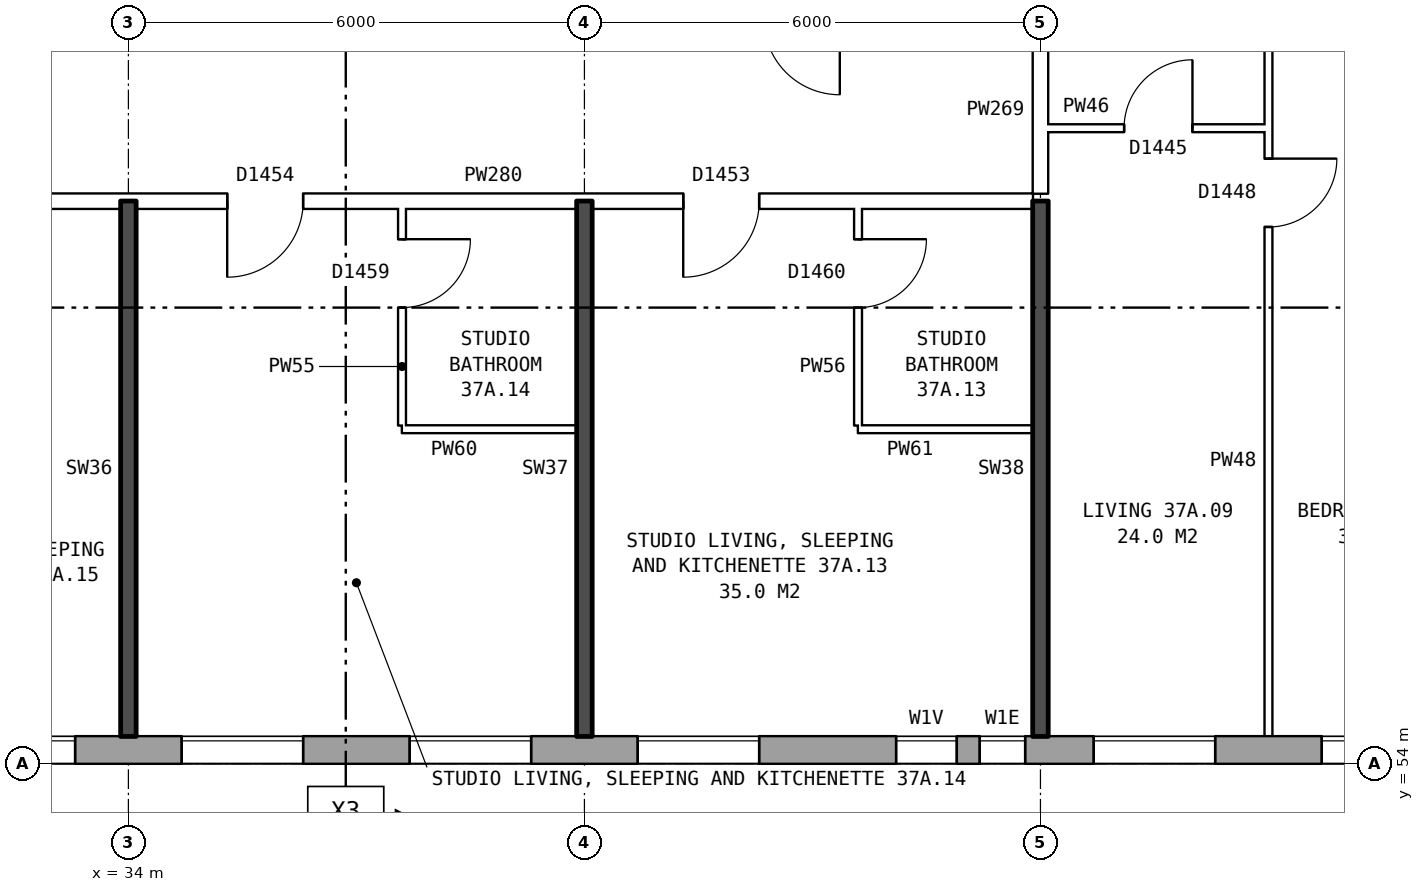
"""IFC4 building model, lengths in metres.
Left out: names, types, materials, properties, quantities, classifications, styles, units other than length and angle.
Written with IfcOpenShell. Run it as: python <this file> out.ifc"""

import sys

from ifc_helpers import new_model, si_unit, direction, frame, frame_2d, origin, place, context, subcontext, project, spatial, rectangle, extrude, element, fill, save


model = new_model("IFC4")
c1 = context("Model", 3, precision=1e-05, world=origin(), true_north=direction((0.0, 1.0)))
c2 = subcontext(c1, "Body", "Model", "MODEL_VIEW")
j1 = project(units=[si_unit("LENGTHUNIT", "METRE"), si_unit("PLANEANGLEUNIT", "RADIAN")], contexts=[c1])
p1 = place(None, origin())
s1 = spatial("IfcSite", under=j1, at=p1, CompositionType="ELEMENT")
p2 = place(p1, origin())
s2 = spatial("IfcBuilding", under=s1, at=p2, CompositionType="ELEMENT")
p3 = place(p2, frame((0.0, 0.0, 133.0)))
s3 = spatial("IfcBuildingStorey", under=s2, at=p3, CompositionType="ELEMENT", Elevation=133.0)
p4 = place(p3, frame((29.825, 54.18, 0.0), z_axis=(0.0, 0.0, 1.0), x_axis=(1.0, 0.0, 0.0)))
e1 = element("IfcWall", 1, at=p4, inside=s3, PredefinedType="STANDARD", context=c2, shape_type="SweptSolid", body=[
    extrude(rectangle(XDim=43.101, YDim=0.36, at=frame_2d((21.55, 0.0))), origin(), (0.0, 0.0, 1.0), 2.85),
])
p5 = place(p4, frame((1.875, 0.0, 0.8)))
e2 = element("IfcOpeningElement", 2, at=p5, cuts=e1, PredefinedType="OPENING", context=c2, shape_type="SweptSolid", body=[
    extrude(rectangle(XDim=1.6, YDim=1.8, at=frame_2d((0.8, 0.9))), frame((0.0, 0.19, 0.0), z_axis=(0.0, -1.0, 0.0), x_axis=(1.0, 0.0, 0.0)), (0.0, 0.0, 1.0), 0.38),
])
p6 = place(p4, frame((4.875, 0.0, 0.8)))
e3 = element("IfcOpeningElement", 3, at=p6, cuts=e1, PredefinedType="OPENING", context=c2, shape_type="SweptSolid", body=[
    extrude(rectangle(XDim=1.6, YDim=1.8, at=frame_2d((0.8, 0.9))), frame((0.0, 0.19, 0.0), z_axis=(0.0, -1.0, 0.0), x_axis=(1.0, 0.0, 0.0)), (0.0, 0.0, 1.0), 0.38),
])
p7 = place(p4, frame((7.875, 0.0, 0.8)))
e4 = element("IfcOpeningElement", 4, at=p7, cuts=e1, PredefinedType="OPENING", context=c2, shape_type="SweptSolid", body=[
    extrude(rectangle(XDim=1.6, YDim=1.8, at=frame_2d((0.8, 0.9))), frame((0.0, 0.19, 0.0), z_axis=(0.0, -1.0, 0.0), x_axis=(1.0, 0.0, 0.0)), (0.0, 0.0, 1.0), 0.38),
])
p8 = place(p4, frame((10.875, 0.0, 0.8)))
e5 = element("IfcOpeningElement", 5, at=p8, cuts=e1, PredefinedType="OPENING", context=c2, shape_type="SweptSolid", body=[
    extrude(rectangle(XDim=1.6, YDim=1.8, at=frame_2d((0.8, 0.9))), frame((0.0, 0.19, 0.0), z_axis=(0.0, -1.0, 0.0), x_axis=(1.0, 0.0, 0.0)), (0.0, 0.0, 1.0), 0.38),
])
p9 = place(p4, frame((14.275, 0.0, 0.8)))
e6 = element("IfcOpeningElement", 6, at=p9, cuts=e1, PredefinedType="OPENING", context=c2, shape_type="SweptSolid", body=[
    extrude(rectangle(XDim=0.8, YDim=0.9, at=frame_2d((0.4, 0.45))), frame((0.0, 0.19, 0.0), z_axis=(0.0, -1.0, 0.0), x_axis=(1.0, 0.0, 0.0)), (0.0, 0.0, 1.0), 0.38),
])
p10 = place(p4, frame((16.875, 0.0, 0.8)))
e7 = element("IfcOpeningElement", 7, at=p10, cuts=e1, PredefinedType="OPENING", context=c2, shape_type="SweptSolid", body=[
    extrude(rectangle(XDim=1.6, YDim=1.8, at=frame_2d((0.8, 0.9))), frame((0.0, 0.19, 0.0), z_axis=(0.0, -1.0, 0.0), x_axis=(1.0, 0.0, 0.0)), (0.0, 0.0, 1.0), 0.38),
])
p11 = place(p4, frame((19.875, 0.0, 0.8)))
e8 = element("IfcOpeningElement", 8, at=p11, cuts=e1, PredefinedType="OPENING", context=c2, shape_type="SweptSolid", body=[
    extrude(rectangle(XDim=1.6, YDim=1.8, at=frame_2d((0.8, 0.9))), frame((0.0, 0.19, 0.0), z_axis=(0.0, -1.0, 0.0), x_axis=(1.0, 0.0, 0.0)), (0.0, 0.0, 1.0), 0.38),
])
p12 = place(p4, frame((22.875, 0.0, 0.8)))
e9 = element("IfcOpeningElement", 9, at=p12, cuts=e1, PredefinedType="OPENING", context=c2, shape_type="SweptSolid", body=[
    extrude(rectangle(XDim=1.6, YDim=1.8, at=frame_2d((0.8, 0.9))), frame((0.0, 0.19, 0.0), z_axis=(0.0, -1.0, 0.0), x_axis=(1.0, 0.0, 0.0)), (0.0, 0.0, 1.0), 0.38),
])
p13 = place(p4, frame((25.875, 0.0, 0.8)))
e10 = element("IfcOpeningElement", 10, at=p13, cuts=e1, PredefinedType="OPENING", context=c2, shape_type="SweptSolid", body=[
    extrude(rectangle(XDim=1.6, YDim=1.8, at=frame_2d((0.8, 0.9))), frame((0.0, 0.19, 0.0), z_axis=(0.0, -1.0, 0.0), x_axis=(1.0, 0.0, 0.0)), (0.0, 0.0, 1.0), 0.38),
])
p14 = place(p4, frame((28.375, 0.0, 0.25)))
e11 = element("IfcOpeningElement", 11, at=p14, cuts=e1, PredefinedType="OPENING", context=c2, shape_type="SweptSolid", body=[
    extrude(rectangle(XDim=1.0, YDim=0.9, at=frame_2d((0.5, 0.45))), frame((0.0, 0.19, 0.0), z_axis=(0.0, -1.0, 0.0), x_axis=(1.0, 0.0, 0.0)), (0.0, 0.0, 1.0), 0.38),
])
p15 = place(p4, frame((31.875, 0.0, 0.8)))
e12 = element("IfcOpeningElement", 12, at=p15, cuts=e1, PredefinedType="OPENING", context=c2, shape_type="SweptSolid", body=[
    extrude(rectangle(XDim=1.6, YDim=1.8, at=frame_2d((0.8, 0.9))), frame((0.0, 0.19, 0.0), z_axis=(0.0, -1.0, 0.0), x_axis=(1.0, 0.0, 0.0)), (0.0, 0.0, 1.0), 0.38),
])
p16 = place(p4, frame((34.875, 0.0, 0.8)))
e13 = element("IfcOpeningElement", 13, at=p16, cuts=e1, PredefinedType="OPENING", context=c2, shape_type="SweptSolid", body=[
    extrude(rectangle(XDim=1.6, YDim=1.8, at=frame_2d((0.8, 0.9))), frame((0.0, 0.19, 0.0), z_axis=(0.0, -1.0, 0.0), x_axis=(1.0, 0.0, 0.0)), (0.0, 0.0, 1.0), 0.38),
])
p17 = place(p4, frame((37.875, 0.0, 0.8)))
e14 = element("IfcOpeningElement", 14, at=p17, cuts=e1, PredefinedType="OPENING", context=c2, shape_type="SweptSolid", body=[
    extrude(rectangle(XDim=1.6, YDim=1.8, at=frame_2d((0.8, 0.9))), frame((0.0, 0.19, 0.0), z_axis=(0.0, -1.0, 0.0), x_axis=(1.0, 0.0, 0.0)), (0.0, 0.0, 1.0), 0.38),
])
p18 = place(p4, frame((40.875, 0.0, 0.8)))
e15 = element("IfcOpeningElement", 15, at=p18, cuts=e1, PredefinedType="OPENING", context=c2, shape_type="SweptSolid", body=[
    extrude(rectangle(XDim=1.6, YDim=1.8, at=frame_2d((0.8, 0.9))), frame((0.0, 0.19, 0.0), z_axis=(0.0, -1.0, 0.0), x_axis=(1.0, 0.0, 0.0)), (0.0, 0.0, 1.0), 0.38),
])
p19 = place(p4, frame((15.375, 0.0, 0.8)))
e16 = element("IfcOpeningElement", 16, at=p19, cuts=e1, PredefinedType="OPENING", context=c2, shape_type="SweptSolid", body=[
    extrude(rectangle(XDim=0.6, YDim=1.8, at=frame_2d((0.3, 0.9))), frame((0.0, 0.19, 0.0), z_axis=(0.0, -1.0, 0.0), x_axis=(1.0, 0.0, 0.0)), (0.0, 0.0, 1.0), 0.38),
])
p20 = place(p4, frame((30.025, 0.0, 1.65)))
e17 = element("IfcOpeningElement", 17, at=p20, cuts=e1, PredefinedType="OPENING", context=c2, shape_type="SweptSolid", body=[
    extrude(rectangle(XDim=1.0, YDim=0.9, at=frame_2d((0.5, 0.45))), frame((0.0, 0.19, 0.0), z_axis=(0.0, -1.0, 0.0), x_axis=(1.0, 0.0, 0.0)), (0.0, 0.0, 1.0), 0.38),
])
for number, where, z_axis, x_axis in (
    (18, (37.6, 58.4, 0.0), (0.0, 0.0, 1.0), (1.0, 0.0, 0.0)),
    (19, (43.6, 58.4, 0.0), (0.0, 0.0, 1.0), (1.0, 0.0, 0.0)),
):
    element("IfcWall", number, at=place(p3, frame(where, z_axis=z_axis, x_axis=x_axis)), inside=s3, PredefinedType="PARTITIONING", context=c2, shape_type="SweptSolid", body=[
        extrude(rectangle(XDim=2.3, YDim=0.1, at=frame_2d((1.15, 0.0))), origin(), (0.0, 0.0, 1.0), 2.85),
    ])
p21 = place(p3, frame((27.11, 61.4, 0.0), z_axis=(0.0, 0.0, 1.0), x_axis=(1.0, 0.0, 0.0)))
e20 = element("IfcWall", 20, at=p21, inside=s3, PredefinedType="PARTITIONING", context=c2, shape_type="SweptSolid", body=[
    extrude(rectangle(XDim=18.79, YDim=0.2, at=frame_2d((9.395, 0.0))), origin(), (0.0, 0.0, 1.0), 2.85),
])
p22 = place(p21, frame((14.19, 0.0, 0.0)))
e21 = element("IfcOpeningElement", 21, at=p22, cuts=e20, PredefinedType="OPENING", context=c2, shape_type="SweptSolid", body=[
    extrude(rectangle(XDim=1.0, YDim=2.1, at=frame_2d((0.5, 1.05))), frame((0.0, 0.11, 0.0), z_axis=(0.0, -1.0, 0.0), x_axis=(1.0, 0.0, 0.0)), (0.0, 0.0, 1.0), 0.22),
])
p23 = place(p21, frame((8.19, 0.0, 0.0)))
e22 = element("IfcOpeningElement", 22, at=p23, cuts=e20, PredefinedType="OPENING", context=c2, shape_type="SweptSolid", body=[
    extrude(rectangle(XDim=1.0, YDim=2.1, at=frame_2d((0.5, 1.05))), frame((0.0, 0.11, 0.0), z_axis=(0.0, -1.0, 0.0), x_axis=(1.0, 0.0, 0.0)), (0.0, 0.0, 1.0), 0.22),
])
p24 = place(p21, frame((4.59, 0.0, 0.0)))
e23 = element("IfcOpeningElement", 23, at=p24, cuts=e20, PredefinedType="OPENING", context=c2, shape_type="SweptSolid", body=[
    extrude(rectangle(XDim=1.0, YDim=2.1, at=frame_2d((0.5, 1.05))), frame((0.0, 0.11, 0.0), z_axis=(0.0, -1.0, 0.0), x_axis=(1.0, 0.0, 0.0)), (0.0, 0.0, 1.0), 0.22),
])
p25 = place(p3, frame((46.1, 62.36, 0.0), z_axis=(0.0, 0.0, 1.0), x_axis=(1.0, 0.0, 0.0)))
e24 = element("IfcWall", 24, at=p25, inside=s3, PredefinedType="PARTITIONING", context=c2, shape_type="SweptSolid", body=[
    extrude(rectangle(XDim=2.9, YDim=0.1, at=frame_2d((1.45, 0.0))), origin(), (0.0, 0.0, 1.0), 2.85),
])
p26 = place(p25, frame((1.0, 0.0, 0.0)))
e25 = element("IfcOpeningElement", 25, at=p26, cuts=e24, PredefinedType="OPENING", context=c2, shape_type="SweptSolid", body=[
    extrude(rectangle(XDim=0.9, YDim=2.1, at=frame_2d((0.45, 1.05))), frame((0.0, 0.06, 0.0), z_axis=(0.0, -1.0, 0.0), x_axis=(1.0, 0.0, 0.0)), (0.0, 0.0, 1.0), 0.12),
])
p27 = place(p3, frame((34.0, 54.36, 0.0), z_axis=(0.0, 0.0, 1.0), x_axis=(0.0, 1.0, 0.0)))
e26 = element("IfcWall", 26, at=p27, inside=s3, PredefinedType="SOLIDWALL", context=c2, shape_type="SweptSolid", body=[
    extrude(rectangle(XDim=7.04, YDim=0.2, at=frame_2d((3.52, 0.0))), origin(), (0.0, 0.0, 1.0), 2.85),
])
p28 = place(p3, frame((37.6, 58.45, 0.0), z_axis=(0.0, 0.0, 1.0), x_axis=(0.0, 1.0, 0.0)))
e27 = element("IfcWall", 27, at=p28, inside=s3, PredefinedType="PARTITIONING", context=c2, shape_type="SweptSolid", body=[
    extrude(rectangle(XDim=2.85, YDim=0.1, at=frame_2d((1.425, 0.0))), origin(), (0.0, 0.0, 1.0), 2.85),
])
p29 = place(p28, frame((1.55, 0.0, 0.0)))
e28 = element("IfcOpeningElement", 28, at=p29, cuts=e27, PredefinedType="OPENING", context=c2, shape_type="SweptSolid", body=[
    extrude(rectangle(XDim=0.9, YDim=2.1, at=frame_2d((0.45, 1.05))), frame((0.0, 0.06, 0.0), z_axis=(0.0, -1.0, 0.0), x_axis=(1.0, 0.0, 0.0)), (0.0, 0.0, 1.0), 0.12),
])
p30 = place(p3, frame((40.0, 54.36, 0.0), z_axis=(0.0, 0.0, 1.0), x_axis=(0.0, 1.0, 0.0)))
e29 = element("IfcWall", 29, at=p30, inside=s3, PredefinedType="SOLIDWALL", context=c2, shape_type="SweptSolid", body=[
    extrude(rectangle(XDim=7.04, YDim=0.2, at=frame_2d((3.52, 0.0))), origin(), (0.0, 0.0, 1.0), 2.85),
])
p31 = place(p3, frame((43.6, 58.45, 0.0), z_axis=(0.0, 0.0, 1.0), x_axis=(0.0, 1.0, 0.0)))
e30 = element("IfcWall", 30, at=p31, inside=s3, PredefinedType="PARTITIONING", context=c2, shape_type="SweptSolid", body=[
    extrude(rectangle(XDim=2.85, YDim=0.1, at=frame_2d((1.425, 0.0))), origin(), (0.0, 0.0, 1.0), 2.85),
])
p32 = place(p31, frame((1.55, 0.0, 0.0)))
e31 = element("IfcOpeningElement", 31, at=p32, cuts=e30, PredefinedType="OPENING", context=c2, shape_type="SweptSolid", body=[
    extrude(rectangle(XDim=0.9, YDim=2.1, at=frame_2d((0.45, 1.05))), frame((0.0, 0.06, 0.0), z_axis=(0.0, -1.0, 0.0), x_axis=(1.0, 0.0, 0.0)), (0.0, 0.0, 1.0), 0.12),
])
p33 = place(p3, frame((46.0, 54.36, 0.0), z_axis=(0.0, 0.0, 1.0), x_axis=(0.0, 1.0, 0.0)))
e32 = element("IfcWall", 32, at=p33, inside=s3, PredefinedType="SOLIDWALL", context=c2, shape_type="SweptSolid", body=[
    extrude(rectangle(XDim=7.04, YDim=0.2, at=frame_2d((3.52, 0.0))), origin(), (0.0, 0.0, 1.0), 2.85),
])
p34 = place(p3, frame((46.0, 61.5, 0.0), z_axis=(0.0, 0.0, 1.0), x_axis=(0.0, 1.0, 0.0)))
e33 = element("IfcWall", 33, at=p34, inside=s3, PredefinedType="PARTITIONING", context=c2, shape_type="SweptSolid", body=[
    extrude(rectangle(XDim=2.2, YDim=0.2, at=frame_2d((1.1, 0.0))), origin(), (0.0, 0.0, 1.0), 2.85),
])
p35 = place(p3, frame((49.0, 54.36, 0.0), z_axis=(0.0, 0.0, 1.0), x_axis=(0.0, 1.0, 0.0)))
e34 = element("IfcWall", 34, at=p35, inside=s3, PredefinedType="PARTITIONING", context=c2, shape_type="SweptSolid", body=[
    extrude(rectangle(XDim=14.34, YDim=0.1, at=frame_2d((7.17, 0.0))), origin(), (0.0, 0.0, 1.0), 2.85),
])
p36 = place(p35, frame((6.7, 0.0, 0.0)))
e35 = element("IfcOpeningElement", 35, at=p36, cuts=e34, PredefinedType="OPENING", context=c2, shape_type="SweptSolid", body=[
    extrude(rectangle(XDim=0.9, YDim=2.1, at=frame_2d((0.45, 1.05))), frame((0.0, 0.06, 0.0), z_axis=(0.0, -1.0, 0.0), x_axis=(1.0, 0.0, 0.0)), (0.0, 0.0, 1.0), 0.12),
])
p37 = place(p35, frame((13.04, 0.0, 0.0)))
e36 = element("IfcOpeningElement", 36, at=p37, cuts=e34, PredefinedType="OPENING", context=c2, shape_type="SweptSolid", body=[
    extrude(rectangle(XDim=0.9, YDim=2.1, at=frame_2d((0.45, 1.05))), frame((0.0, 0.06, 0.0), z_axis=(0.0, -1.0, 0.0), x_axis=(1.0, 0.0, 0.0)), (0.0, 0.0, 1.0), 0.12),
])
p38 = place(p5, origin())
e37 = element("IfcWindow", 37, at=p38, inside=s3, PartitioningType="SINGLE_PANEL", PredefinedType="WINDOW", context=c2, shape_type="SweptSolid", body=[
    extrude(rectangle(XDim=1.6, YDim=1.8, at=frame_2d((0.8, 0.9))), frame((0.0, 0.15, 0.0), z_axis=(0.0, -1.0, 0.0), x_axis=(1.0, 0.0, 0.0)), (0.0, 0.0, 1.0), 0.06),
])
fill(e2, e37)
p39 = place(p6, origin())
e38 = element("IfcWindow", 38, at=p39, inside=s3, PartitioningType="SINGLE_PANEL", PredefinedType="WINDOW", context=c2, shape_type="SweptSolid", body=[
    extrude(rectangle(XDim=1.6, YDim=1.8, at=frame_2d((0.8, 0.9))), frame((0.0, 0.15, 0.0), z_axis=(0.0, -1.0, 0.0), x_axis=(1.0, 0.0, 0.0)), (0.0, 0.0, 1.0), 0.06),
])
fill(e3, e38)
p40 = place(p7, origin())
e39 = element("IfcWindow", 39, at=p40, inside=s3, PartitioningType="SINGLE_PANEL", PredefinedType="WINDOW", context=c2, shape_type="SweptSolid", body=[
    extrude(rectangle(XDim=1.6, YDim=1.8, at=frame_2d((0.8, 0.9))), frame((0.0, 0.15, 0.0), z_axis=(0.0, -1.0, 0.0), x_axis=(1.0, 0.0, 0.0)), (0.0, 0.0, 1.0), 0.06),
])
fill(e4, e39)
p41 = place(p8, origin())
e40 = element("IfcWindow", 40, at=p41, inside=s3, PartitioningType="SINGLE_PANEL", PredefinedType="WINDOW", context=c2, shape_type="SweptSolid", body=[
    extrude(rectangle(XDim=1.6, YDim=1.8, at=frame_2d((0.8, 0.9))), frame((0.0, 0.15, 0.0), z_axis=(0.0, -1.0, 0.0), x_axis=(1.0, 0.0, 0.0)), (0.0, 0.0, 1.0), 0.06),
])
fill(e5, e40)
p42 = place(p9, origin())
e41 = element("IfcWindow", 41, at=p42, inside=s3, PartitioningType="SINGLE_PANEL", PredefinedType="WINDOW", context=c2, shape_type="SweptSolid", body=[
    extrude(rectangle(XDim=0.8, YDim=0.9, at=frame_2d((0.4, 0.45))), frame((0.0, 0.15, 0.0), z_axis=(0.0, -1.0, 0.0), x_axis=(1.0, 0.0, 0.0)), (0.0, 0.0, 1.0), 0.06),
])
fill(e6, e41)
p43 = place(p10, origin())
e42 = element("IfcWindow", 42, at=p43, inside=s3, PartitioningType="SINGLE_PANEL", PredefinedType="WINDOW", context=c2, shape_type="SweptSolid", body=[
    extrude(rectangle(XDim=1.6, YDim=1.8, at=frame_2d((0.8, 0.9))), frame((0.0, 0.15, 0.0), z_axis=(0.0, -1.0, 0.0), x_axis=(1.0, 0.0, 0.0)), (0.0, 0.0, 1.0), 0.06),
])
fill(e7, e42)
p44 = place(p11, origin())
e43 = element("IfcWindow", 43, at=p44, inside=s3, PartitioningType="SINGLE_PANEL", PredefinedType="WINDOW", context=c2, shape_type="SweptSolid", body=[
    extrude(rectangle(XDim=1.6, YDim=1.8, at=frame_2d((0.8, 0.9))), frame((0.0, 0.15, 0.0), z_axis=(0.0, -1.0, 0.0), x_axis=(1.0, 0.0, 0.0)), (0.0, 0.0, 1.0), 0.06),
])
fill(e8, e43)
p45 = place(p36, frame((0.9, 0.0, 0.0), z_axis=(0.0, 0.0, 1.0), x_axis=(-1.0, 0.0, 0.0)))
e44 = element("IfcDoor", 44, at=p45, inside=s3, OperationType="SINGLE_SWING_LEFT", PredefinedType="DOOR", context=c2, shape_type="SweptSolid", body=[
    extrude(rectangle(XDim=0.9, YDim=2.1, at=frame_2d((0.45, 1.05))), frame((0.0, 0.025, 0.0), z_axis=(0.0, -1.0, 0.0), x_axis=(1.0, 0.0, 0.0)), (0.0, 0.0, 1.0), 0.05),
])
fill(e35, e44)
p46 = place(p26, origin())
e45 = element("IfcDoor", 45, at=p46, inside=s3, OperationType="SINGLE_SWING_RIGHT", PredefinedType="DOOR", context=c2, shape_type="SweptSolid", body=[
    extrude(rectangle(XDim=0.9, YDim=2.1, at=frame_2d((0.45, 1.05))), frame((0.0, 0.025, 0.0), z_axis=(0.0, -1.0, 0.0), x_axis=(1.0, 0.0, 0.0)), (0.0, 0.0, 1.0), 0.05),
])
fill(e25, e45)
p47 = place(p22, frame((1.0, 0.0, 0.0), z_axis=(0.0, 0.0, 1.0), x_axis=(-1.0, 0.0, 0.0)))
e46 = element("IfcDoor", 46, at=p47, inside=s3, OperationType="SINGLE_SWING_RIGHT", PredefinedType="DOOR", context=c2, shape_type="SweptSolid", body=[
    extrude(rectangle(XDim=1.0, YDim=2.1, at=frame_2d((0.5, 1.05))), frame((0.0, 0.025, 0.0), z_axis=(0.0, -1.0, 0.0), x_axis=(1.0, 0.0, 0.0)), (0.0, 0.0, 1.0), 0.05),
])
fill(e21, e46)
p48 = place(p32, frame((0.9, 0.0, 0.0), z_axis=(0.0, 0.0, 1.0), x_axis=(-1.0, 0.0, 0.0)))
e47 = element("IfcDoor", 47, at=p48, inside=s3, OperationType="SINGLE_SWING_LEFT", PredefinedType="DOOR", context=c2, shape_type="SweptSolid", body=[
    extrude(rectangle(XDim=0.9, YDim=2.1, at=frame_2d((0.45, 1.05))), frame((0.0, 0.025, 0.0), z_axis=(0.0, -1.0, 0.0), x_axis=(1.0, 0.0, 0.0)), (0.0, 0.0, 1.0), 0.05),
])
fill(e31, e47)
p49 = place(p23, frame((1.0, 0.0, 0.0), z_axis=(0.0, 0.0, 1.0), x_axis=(-1.0, 0.0, 0.0)))
e48 = element("IfcDoor", 48, at=p49, inside=s3, OperationType="SINGLE_SWING_RIGHT", PredefinedType="DOOR", context=c2, shape_type="SweptSolid", body=[
    extrude(rectangle(XDim=1.0, YDim=2.1, at=frame_2d((0.5, 1.05))), frame((0.0, 0.025, 0.0), z_axis=(0.0, -1.0, 0.0), x_axis=(1.0, 0.0, 0.0)), (0.0, 0.0, 1.0), 0.05),
])
fill(e22, e48)
p50 = place(p29, frame((0.9, 0.0, 0.0), z_axis=(0.0, 0.0, 1.0), x_axis=(-1.0, 0.0, 0.0)))
e49 = element("IfcDoor", 49, at=p50, inside=s3, OperationType="SINGLE_SWING_LEFT", PredefinedType="DOOR", context=c2, shape_type="SweptSolid", body=[
    extrude(rectangle(XDim=0.9, YDim=2.1, at=frame_2d((0.45, 1.05))), frame((0.0, 0.025, 0.0), z_axis=(0.0, -1.0, 0.0), x_axis=(1.0, 0.0, 0.0)), (0.0, 0.0, 1.0), 0.05),
])
fill(e28, e49)
p51 = place(p19, origin())
e50 = element("IfcWindow", 50, at=p51, inside=s3, PartitioningType="SINGLE_PANEL", PredefinedType="WINDOW", context=c2, shape_type="SweptSolid", body=[
    extrude(rectangle(XDim=0.6, YDim=1.8, at=frame_2d((0.3, 0.9))), frame((0.0, 0.15, 0.0), z_axis=(0.0, -1.0, 0.0), x_axis=(1.0, 0.0, 0.0)), (0.0, 0.0, 1.0), 0.06),
])
fill(e16, e50)
save(model, sys.argv[1])
